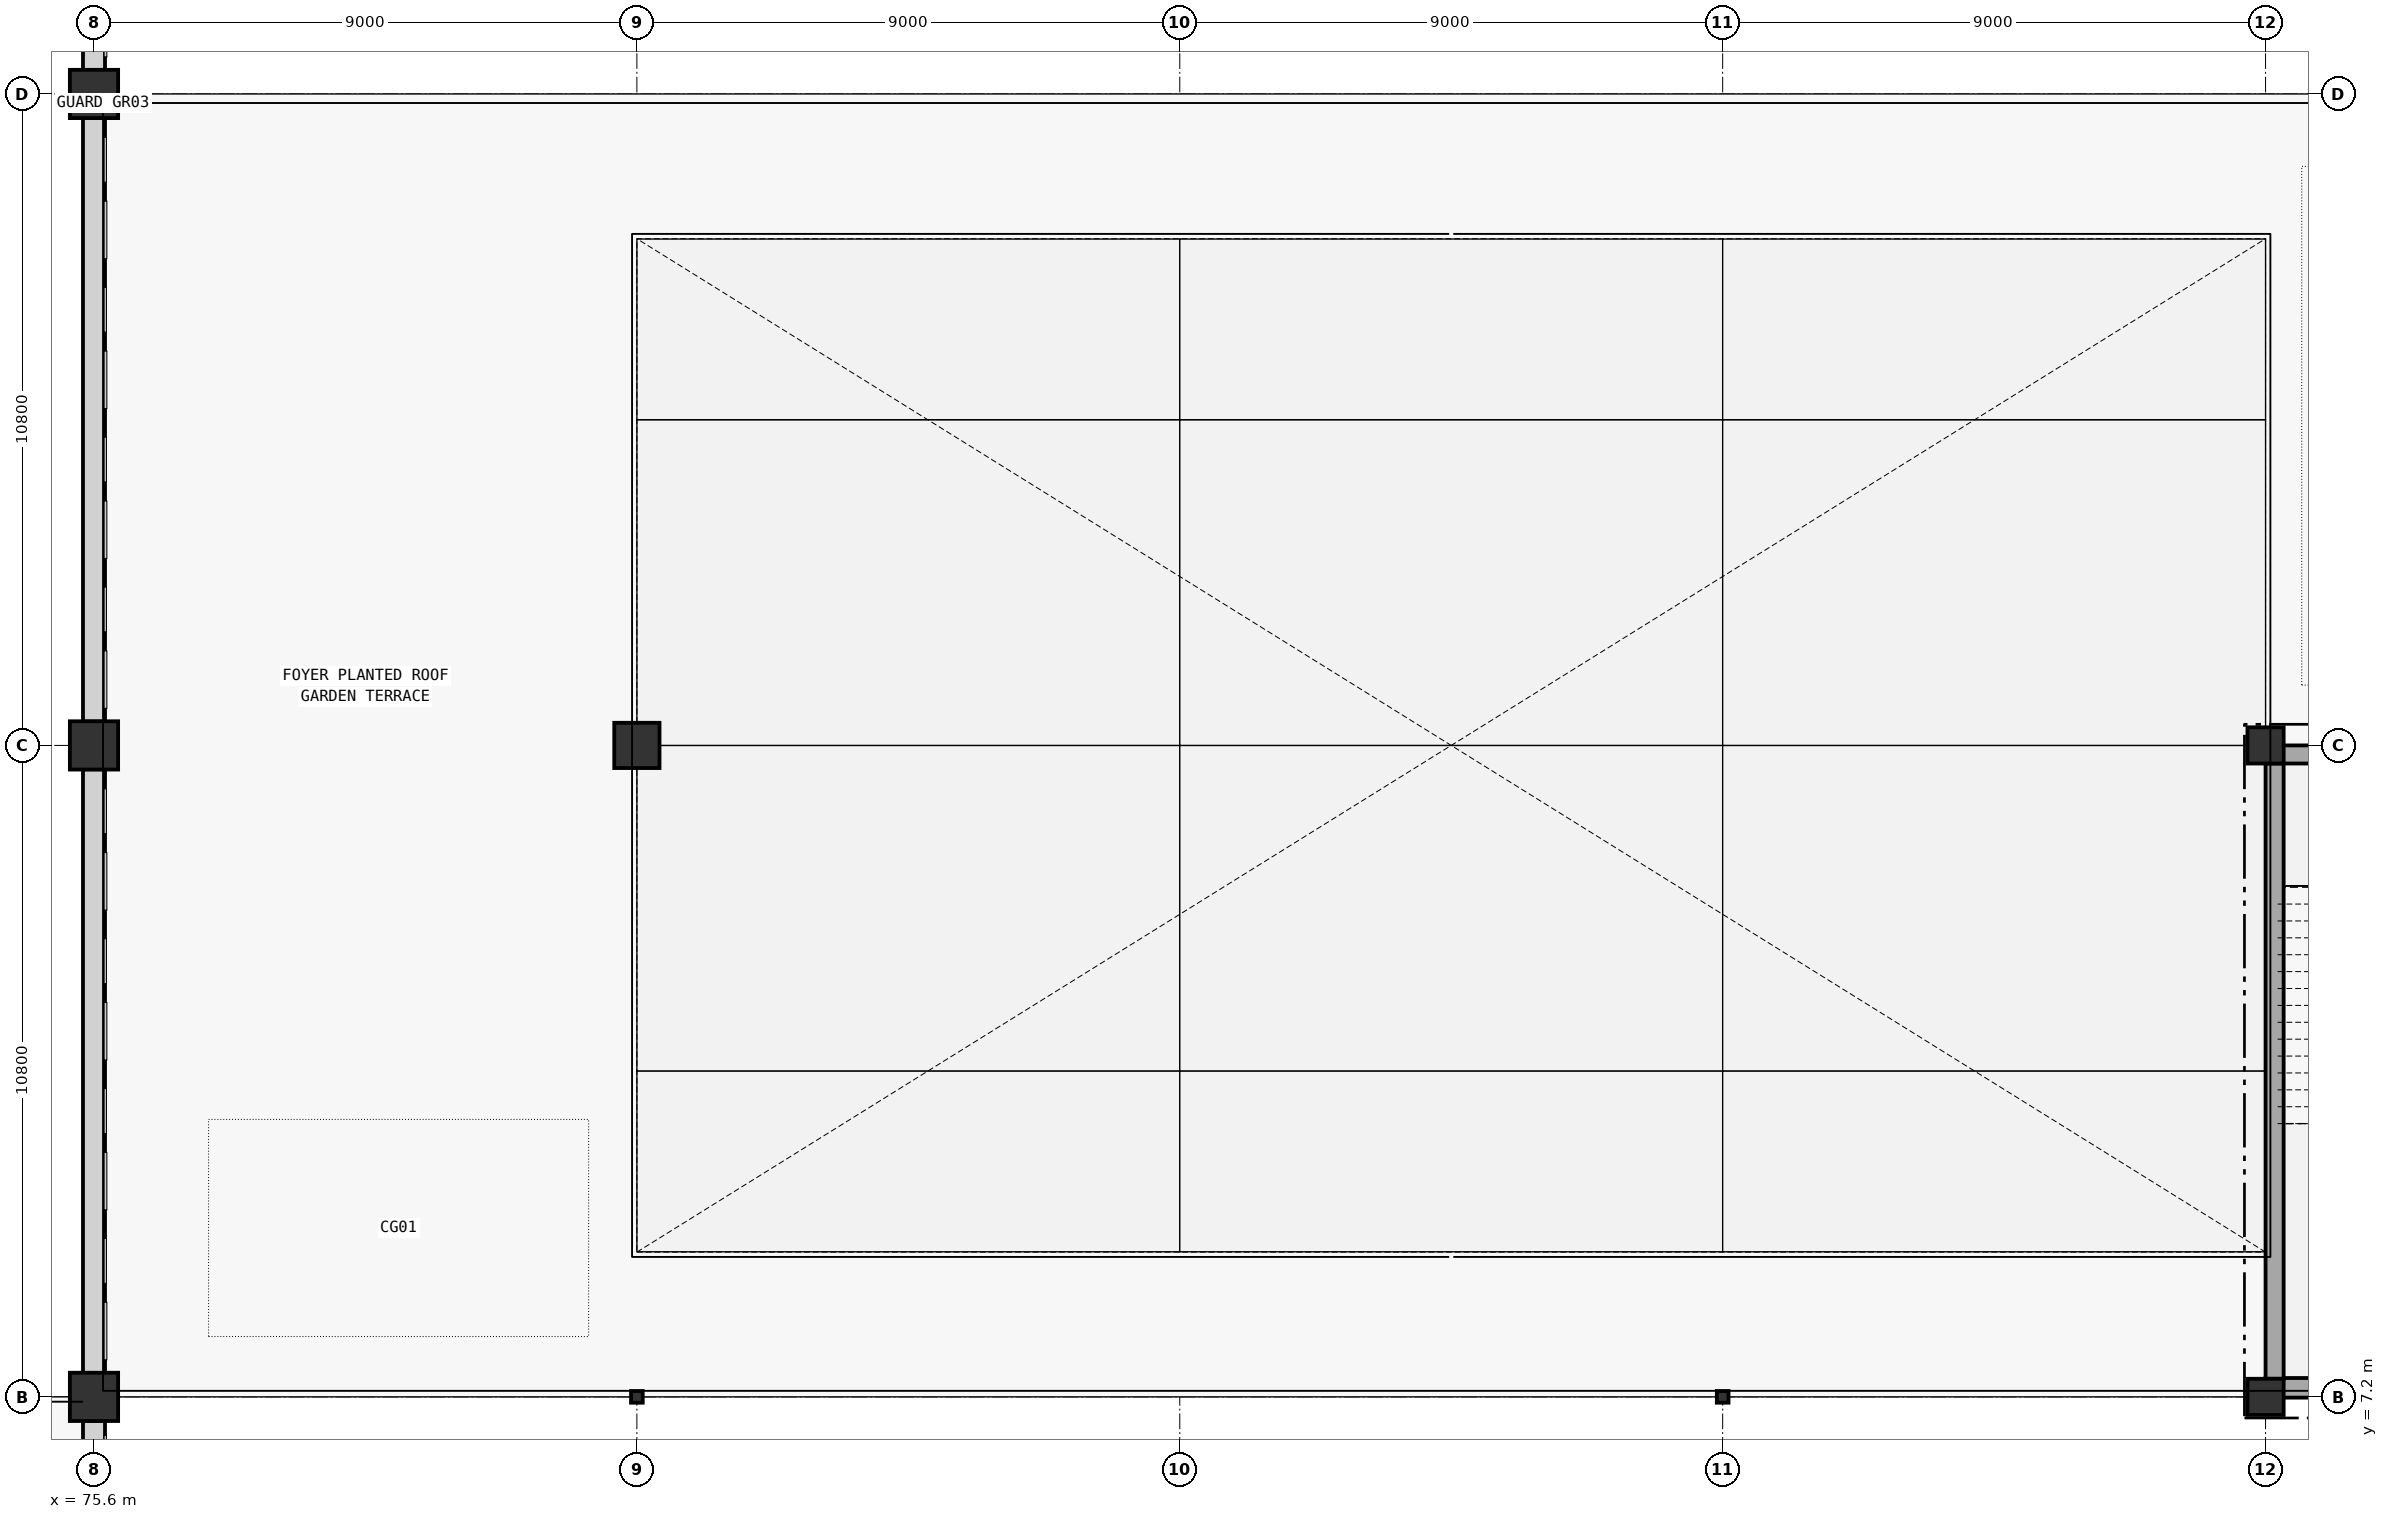
"""IFC4 building model, lengths in metres.
Left out: names, types, materials, properties, quantities, classifications, styles, units other than length and angle.
Written with IfcOpenShell. Run it as: python <this file> out.ifc"""

import sys

from ifc_helpers import new_model, si_unit, direction, frame, frame_2d, origin, origin_2d, place, context, subcontext, project, spatial, rectangle, circle, hollow_circle, extrude, element, save


model = new_model("IFC4")
c1 = context("Model", 3, precision=1e-05, world=origin(), true_north=direction((0.0, 1.0)))
c2 = subcontext(c1, "Body", "Model", "MODEL_VIEW")
j1 = project(units=[si_unit("LENGTHUNIT", "METRE"), si_unit("PLANEANGLEUNIT", "RADIAN")], contexts=[c1])
p1 = place(None, origin())
s1 = spatial("IfcSite", under=j1, at=p1, CompositionType="ELEMENT")
p2 = place(p1, origin())
s2 = spatial("IfcBuilding", under=s1, at=p2, CompositionType="ELEMENT")
p3 = place(p2, frame((0.0, 0.0, 10.8)))
s3 = spatial("IfcBuildingStorey", under=s2, at=p3, CompositionType="ELEMENT", Elevation=10.8)
for number, where, z_axis, x_axis in (
    (1, (75.6, 7.2, 0.0), (0.0, 0.0, 1.0), (1.0, 0.0, 0.0)),
    (2, (75.6, 18.0, 0.0), (0.0, 0.0, 1.0), (1.0, 0.0, 0.0)),
    (3, (75.6, 28.8, 0.0), (0.0, 0.0, 1.0), (1.0, 0.0, 0.0)),
):
    element("IfcColumn", number, at=place(p3, frame(where, z_axis=z_axis, x_axis=x_axis)), inside=s3, PredefinedType="COLUMN", context=c2, shape_type="SweptSolid", body=[
        extrude(rectangle(XDim=0.8, YDim=0.8, at=origin_2d()), origin(), (0.0, 0.0, 1.0), 4.2),
    ])
for number, where, z_axis, x_axis in (
    (4, (111.6, 7.2, 0.0), (0.0, 0.0, 1.0), (1.0, 0.0, 0.0)),
    (5, (111.6, 18.0, 0.0), (0.0, 0.0, 1.0), (1.0, 0.0, 0.0)),
):
    element("IfcColumn", number, at=place(p3, frame(where, z_axis=z_axis, x_axis=x_axis)), inside=s3, PredefinedType="COLUMN", context=c2, shape_type="SweptSolid", body=[
        extrude(rectangle(XDim=0.6, YDim=0.6, at=origin_2d()), origin(), (0.0, 0.0, 1.0), 4.2),
    ])
p4 = place(p3, frame((118.8, 7.35, 0.0), z_axis=(0.0, 0.0, 1.0), x_axis=(-1.0, 0.0, 0.0)))
e6 = element("IfcWall", 6, at=p4, inside=s3, PredefinedType="SHEAR", context=c2, shape_type="SweptSolid", body=[
    extrude(rectangle(XDim=7.2, YDim=0.325, at=frame_2d((3.6, 0.0))), origin(), (0.0, 0.0, 1.0), 4.2),
])
p5 = place(p3, frame((111.6, 17.85, 0.0), z_axis=(0.0, 0.0, 1.0), x_axis=(1.0, 0.0, 0.0)))
e7 = element("IfcWall", 7, at=p5, inside=s3, PredefinedType="SHEAR", context=c2, shape_type="SweptSolid", body=[
    extrude(rectangle(XDim=7.2, YDim=0.3, at=frame_2d((3.6, 0.0))), origin(), (0.0, 0.0, 1.0), 4.2),
])
p6 = place(p5, frame((4.65, 0.0, 0.0)))
e8 = element("IfcOpeningElement", 8, at=p6, cuts=e7, PredefinedType="OPENING", context=c2, shape_type="SweptSolid", body=[
    extrude(rectangle(XDim=1.54, YDim=2.22, at=frame_2d((0.77, 1.11))), frame((0.0, 0.15, 0.0), z_axis=(0.0, -1.0, 0.0), x_axis=(1.0, 0.0, 0.0)), (0.0, 0.0, 1.0), 0.3),
])
p7 = place(p3, frame((111.75, 7.5, 0.0), z_axis=(0.0, 0.0, 1.0), x_axis=(0.0, 1.0, 0.0)))
e9 = element("IfcWall", 9, at=p7, inside=s3, PredefinedType="SHEAR", context=c2, shape_type="SweptSolid", body=[
    extrude(rectangle(XDim=10.2, YDim=0.3, at=frame_2d((5.1, 0.0))), origin(), (0.0, 0.0, 1.0), 4.2),
])
p8 = place(p3, frame((84.6, 18.0, 0.0), z_axis=(0.0, 0.0, 1.0), x_axis=(1.0, 0.0, 0.0)))
e10 = element("IfcColumn", 10, at=p8, inside=s3, PredefinedType="COLUMN", context=c2, shape_type="SweptSolid", body=[
    extrude(circle(Radius=0.375, at=origin_2d()), origin(), (0.0, 0.0, 1.0), 1.62),
])
for number, where, z_axis, x_axis in (
    (11, (84.6, 7.2, 0.0), (0.0, 0.0, 1.0), (1.0, 0.0, 0.0)),
    (12, (102.6, 7.2, 0.0), (0.0, 0.0, 1.0), (1.0, 0.0, 0.0)),
):
    element("IfcColumn", number, at=place(p3, frame(where, z_axis=z_axis, x_axis=x_axis)), inside=s3, PredefinedType="COLUMN", context=c2, shape_type="SweptSolid", body=[
        extrude(hollow_circle(Radius=0.097, WallThickness=0.01, at=origin_2d()), origin(), (0.0, 0.0, 1.0), 2.85),
    ])
p9 = place(p3, frame((75.6, 6.804, -5.45), z_axis=(0.0, 0.0, 1.0), x_axis=(0.0, -1.0, 0.0)))
e13 = element("IfcWall", 13, at=p9, inside=s3, PredefinedType="STANDARD", context=c2, shape_type="SweptSolid", body=[
    extrude(rectangle(XDim=6.408, YDim=0.365, at=frame_2d((3.204, 0.0))), origin(), (0.0, 0.0, 1.0), 4.565),
])
for number, where, z_axis, x_axis in (
    (14, (75.6, 17.604, -0.05), (0.0, 0.0, 1.0), (0.0, -1.0, 0.0)),
    (15, (75.6, 28.404, -0.05), (0.0, 0.0, 1.0), (0.0, -1.0, 0.0)),
):
    element("IfcWall", number, at=place(p3, frame(where, z_axis=z_axis, x_axis=x_axis)), inside=s3, PredefinedType="STANDARD", context=c2, shape_type="SweptSolid", body=[
        extrude(rectangle(XDim=10.008, YDim=0.365, at=frame_2d((5.004, 0.0))), origin(), (0.0, 0.0, 1.0), 4.857),
    ])
p10 = place(p3, frame((75.6, 39.204, -5.45), z_axis=(0.0, 0.0, 1.0), x_axis=(0.0, -1.0, 0.0)))
e16 = element("IfcWall", 16, at=p10, inside=s3, PredefinedType="STANDARD", context=c2, shape_type="SweptSolid", body=[
    extrude(rectangle(XDim=10.008, YDim=0.365, at=frame_2d((5.004, 0.0))), origin(), (0.0, 0.0, 1.0), 5.435),
])
save(model, sys.argv[1])
